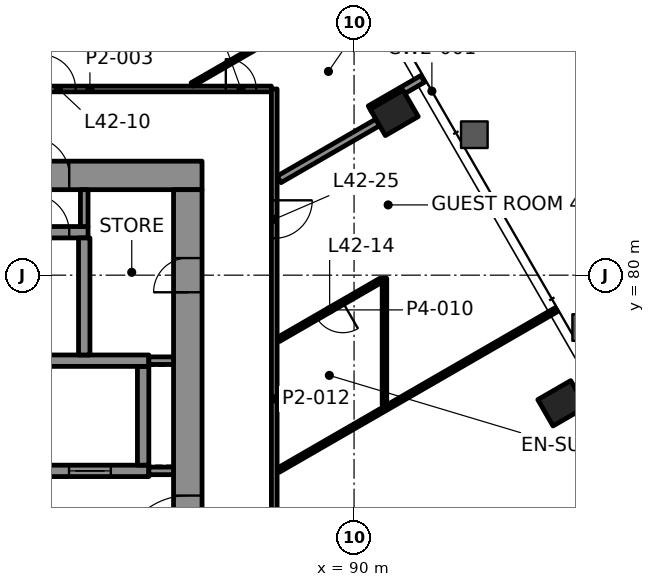
"""IFC4 building model, lengths in metres.
Left out: names, types, materials, properties, quantities, classifications, styles, units other than length and angle.
Written with IfcOpenShell. Run it as: python <this file> out.ifc"""

import sys

from ifc_helpers import new_model, si_unit, direction, frame, frame_2d, origin, origin_2d, place, context, subcontext, project, spatial, rectangle, hollow_rectangle, extrude, element, fill, save


model = new_model("IFC4")
c1 = context("Model", 3, precision=1e-05, world=origin(), true_north=direction((0.0, 1.0)))
c2 = subcontext(c1, "Body", "Model", "MODEL_VIEW")
j1 = project(units=[si_unit("LENGTHUNIT", "METRE"), si_unit("PLANEANGLEUNIT", "RADIAN")], contexts=[c1])
p1 = place(None, origin())
s1 = spatial("IfcSite", under=j1, at=p1, CompositionType="ELEMENT")
p2 = place(p1, origin())
s2 = spatial("IfcBuilding", under=s1, at=p2, CompositionType="ELEMENT")
p3 = place(p2, frame((0.0, 0.0, 183.1)))
s3 = spatial("IfcBuildingStorey", under=s2, at=p3, CompositionType="ELEMENT", Elevation=183.1)
for number, where, z_axis, x_axis in (
    (1, (95.468, 76.628, -0.0), (0.0, 0.0, 1.0), (-0.5, 0.866, 0.0)),
    (2, (91.056, 84.27, -0.0), (0.0, 0.0, 1.0), (-0.5, 0.866, 0.0)),
):
    element("IfcColumn", number, at=place(p3, frame(where, z_axis=z_axis, x_axis=x_axis)), inside=s3, PredefinedType="COLUMN", context=c2, shape_type="SweptSolid", body=[
        extrude(hollow_rectangle(XDim=0.8, YDim=1.0, WallThickness=0.05, at=origin_2d()), origin(), (0.0, 0.0, 1.0), 3.9),
    ])
p4 = place(p3, frame((64.0, 82.625, 0.0), z_axis=(0.0, 0.0, 1.0), x_axis=(1.0, 0.0, 0.0)))
e3 = element("IfcWall", 3, at=p4, inside=s3, PredefinedType="SHEAR", context=c2, shape_type="SweptSolid", body=[
    extrude(rectangle(XDim=22.0, YDim=0.75, at=frame_2d((11.0, 0.0))), origin(), (0.0, 0.0, 1.0), 3.7),
])
p5 = place(p4, frame((3.695, 0.0, 0.0)))
e4 = element("IfcOpeningElement", 4, at=p5, cuts=e3, PredefinedType="OPENING", context=c2, shape_type="SweptSolid", body=[
    extrude(rectangle(XDim=1.0, YDim=2.1, at=frame_2d((0.5, 1.05))), frame((0.0, 0.385, 0.0), z_axis=(0.0, -1.0, 0.0), x_axis=(1.0, 0.0, 0.0)), (0.0, 0.0, 1.0), 0.77),
])
p6 = place(p4, frame((17.505, 0.0, 0.0)))
e5 = element("IfcOpeningElement", 5, at=p6, cuts=e3, PredefinedType="OPENING", context=c2, shape_type="SweptSolid", body=[
    extrude(rectangle(XDim=1.0, YDim=2.1, at=frame_2d((0.5, 1.05))), frame((0.0, 0.385, 0.0), z_axis=(0.0, -1.0, 0.0), x_axis=(1.0, 0.0, 0.0)), (0.0, 0.0, 1.0), 0.77),
])
p7 = place(p4, frame((10.65, 0.0, 0.0)))
e6 = element("IfcOpeningElement", 6, at=p7, cuts=e3, PredefinedType="OPENING", context=c2, shape_type="SweptSolid", body=[
    extrude(rectangle(XDim=0.9, YDim=2.1, at=frame_2d((0.45, 1.05))), frame((0.0, 0.385, 0.0), z_axis=(0.0, -1.0, 0.0), x_axis=(1.0, 0.0, 0.0)), (0.0, 0.0, 1.0), 0.77),
])
p8 = place(p3, frame((85.625, 67.75, 0.0), z_axis=(0.0, 0.0, 1.0), x_axis=(0.0, 1.0, 0.0)))
e7 = element("IfcWall", 7, at=p8, inside=s3, PredefinedType="SHEAR", context=c2, shape_type="SweptSolid", body=[
    extrude(rectangle(XDim=14.5, YDim=0.75, at=frame_2d((7.25, 0.0))), origin(), (0.0, 0.0, 1.0), 3.7),
])
p9 = place(p8, frame((4.65, 0.0, 0.0)))
e8 = element("IfcOpeningElement", 8, at=p9, cuts=e7, PredefinedType="OPENING", context=c2, shape_type="SweptSolid", body=[
    extrude(rectangle(XDim=1.8, YDim=2.1, at=frame_2d((0.9, 1.05))), frame((0.0, 0.385, 0.0), z_axis=(0.0, -1.0, 0.0), x_axis=(1.0, 0.0, 0.0)), (0.0, 0.0, 1.0), 0.77),
])
p10 = place(p8, frame((11.8, 0.0, 0.0)))
e9 = element("IfcOpeningElement", 9, at=p10, cuts=e7, PredefinedType="OPENING", context=c2, shape_type="SweptSolid", body=[
    extrude(rectangle(XDim=0.9, YDim=2.1, at=frame_2d((0.45, 1.05))), frame((0.0, 0.385, 0.0), z_axis=(0.0, -1.0, 0.0), x_axis=(1.0, 0.0, 0.0)), (0.0, 0.0, 1.0), 0.77),
])
p11 = place(p3, frame((70.3, 74.85, 0.0), z_axis=(0.0, 0.0, 1.0), x_axis=(1.0, 0.0, 0.0)))
e10 = element("IfcWall", 10, at=p11, inside=s3, PredefinedType="SHEAR", context=c2, shape_type="SweptSolid", body=[
    extrude(rectangle(XDim=14.3, YDim=0.3, at=frame_2d((7.15, 0.0))), origin(), (0.0, 0.0, 1.0), 3.7),
])
p12 = place(p11, frame((3.8, 0.0, 0.0)))
e11 = element("IfcOpeningElement", 11, at=p12, cuts=e10, PredefinedType="OPENING", context=c2, shape_type="SweptSolid", body=[
    extrude(rectangle(XDim=1.1, YDim=2.1, at=frame_2d((0.55, 1.05))), frame((0.0, 0.16, 0.0), z_axis=(0.0, -1.0, 0.0), x_axis=(1.0, 0.0, 0.0)), (0.0, 0.0, 1.0), 0.32),
])
p13 = place(p11, frame((12.2, 0.0, 0.0)))
e12 = element("IfcOpeningElement", 12, at=p13, cuts=e10, PredefinedType="OPENING", context=c2, shape_type="SweptSolid", body=[
    extrude(rectangle(XDim=1.1, YDim=2.1, at=frame_2d((0.55, 1.05))), frame((0.0, 0.16, 0.0), z_axis=(0.0, -1.0, 0.0), x_axis=(1.0, 0.0, 0.0)), (0.0, 0.0, 1.0), 0.32),
])
p14 = place(p3, frame((84.45, 75.0, 0.0), z_axis=(0.0, 0.0, 1.0), x_axis=(0.0, 1.0, 0.0)))
e13 = element("IfcWall", 13, at=p14, inside=s3, PredefinedType="SHEAR", context=c2, shape_type="SweptSolid", body=[
    extrude(rectangle(XDim=2.6, YDim=0.3, at=frame_2d((1.3, 0.0))), origin(), (0.0, 0.0, 1.0), 3.7),
])
p15 = place(p3, frame((67.15, 77.75, 0.0), z_axis=(0.0, 0.0, 1.0), x_axis=(1.0, 0.0, 0.0)))
e14 = element("IfcWall", 14, at=p15, inside=s3, PredefinedType="SHEAR", context=c2, shape_type="SweptSolid", body=[
    extrude(rectangle(XDim=17.45, YDim=0.3, at=frame_2d((8.725, 0.0))), origin(), (0.0, 0.0, 1.0), 3.7),
])
p16 = place(p15, frame((0.545, 0.0, 0.0)))
e15 = element("IfcOpeningElement", 15, at=p16, cuts=e14, PredefinedType="OPENING", context=c2, shape_type="SweptSolid", body=[
    extrude(rectangle(XDim=1.0, YDim=2.1, at=frame_2d((0.5, 1.05))), frame((0.0, 0.16, 0.0), z_axis=(0.0, -1.0, 0.0), x_axis=(1.0, 0.0, 0.0)), (0.0, 0.0, 1.0), 0.32),
])
p17 = place(p3, frame((76.14, 81.13, 0.0), z_axis=(0.0, 0.0, 1.0), x_axis=(1.0, 0.0, 0.0)))
e16 = element("IfcWall", 16, at=p17, inside=s3, PredefinedType="SHEAR", context=c2, shape_type="SweptSolid", body=[
    extrude(rectangle(XDim=6.86, YDim=0.3, at=frame_2d((3.43, 0.0))), origin(), (0.0, 0.0, 1.0), 3.7),
])
p18 = place(p17, frame((5.365, 0.0, 0.0)))
e17 = element("IfcOpeningElement", 17, at=p18, cuts=e16, PredefinedType="OPENING", context=c2, shape_type="SweptSolid", body=[
    extrude(rectangle(XDim=1.0, YDim=2.1, at=frame_2d((0.5, 1.05))), frame((0.0, 0.16, 0.0), z_axis=(0.0, -1.0, 0.0), x_axis=(1.0, 0.0, 0.0)), (0.0, 0.0, 1.0), 0.32),
])
p19 = place(p3, frame((82.9, 77.9, 0.0), z_axis=(0.0, 0.0, 1.0), x_axis=(0.0, 1.0, 0.0)))
e18 = element("IfcWall", 18, at=p19, inside=s3, PredefinedType="SHEAR", context=c2, shape_type="SweptSolid", body=[
    extrude(rectangle(XDim=3.08, YDim=0.3, at=frame_2d((1.54, 0.0))), origin(), (0.0, 0.0, 1.0), 3.7),
])
p20 = place(p3, frame((78.275, 84.9, 0.0), z_axis=(0.0, 0.0, 1.0), x_axis=(1.0, 0.0, 0.0)))
e19 = element("IfcWall", 19, at=p20, inside=s3, PredefinedType="PARTITIONING", context=c2, shape_type="SweptSolid", body=[
    extrude(rectangle(XDim=9.55, YDim=0.15, at=frame_2d((4.775, 0.0))), origin(), (0.0, 0.0, 1.0), 3.1),
])
p21 = place(p20, frame((3.497, 0.0, 0.0)))
e20 = element("IfcOpeningElement", 20, at=p21, cuts=e19, PredefinedType="OPENING", context=c2, shape_type="SweptSolid", body=[
    extrude(rectangle(XDim=0.9, YDim=2.1, at=frame_2d((0.45, 1.05))), frame((0.0, 0.085, 0.0), z_axis=(0.0, -1.0, 0.0), x_axis=(1.0, 0.0, 0.0)), (0.0, 0.0, 1.0), 0.17),
])
p22 = place(p20, frame((8.351, 0.0, 0.0)))
e21 = element("IfcOpeningElement", 21, at=p22, cuts=e19, PredefinedType="OPENING", context=c2, shape_type="SweptSolid", body=[
    extrude(rectangle(XDim=0.8, YDim=2.1, at=frame_2d((0.4, 1.05))), frame((0.0, 0.085, 0.0), z_axis=(0.0, -1.0, 0.0), x_axis=(1.0, 0.0, 0.0)), (0.0, 0.0, 1.0), 0.17),
])
p23 = place(p3, frame((88.01, 74.869, 0.0), z_axis=(0.0, 0.0, 1.0), x_axis=(0.866017924271, 0.500012954673, 0.0)))
e22 = element("IfcWall", 22, at=p23, inside=s3, PredefinedType="PARTITIONING", context=c2, shape_type="SweptSolid", body=[
    extrude(rectangle(XDim=8.439, YDim=0.12, at=frame_2d((4.219, 0.0))), origin(), (0.0, 0.0, 1.0), 3.022),
])
p24 = place(p3, frame((90.705, 79.865, 0.0), z_axis=(0.0, 0.0, 1.0), x_axis=(-0.866009247561, -0.500027982357, 0.0)))
e23 = element("IfcWall", 23, at=p24, inside=s3, PredefinedType="PARTITIONING", context=c2, shape_type="SweptSolid", body=[
    extrude(rectangle(XDim=3.113, YDim=0.12, at=frame_2d((1.556, 0.0))), origin(), (0.0, 0.0, 1.0), 3.1),
])
p25 = place(p24, frame((1.156, 0.0, 0.0)))
e24 = element("IfcOpeningElement", 24, at=p25, cuts=e23, PredefinedType="OPENING", context=c2, shape_type="SweptSolid", body=[
    extrude(rectangle(XDim=0.8, YDim=2.1, at=frame_2d((0.4, 1.05))), frame((0.0, 0.07, 0.0), z_axis=(0.0, -1.0, 0.0), x_axis=(1.0, 0.0, 0.0)), (0.0, 0.0, 1.0), 0.14),
])
p26 = place(p3, frame((88.027, 82.521, 0.0), z_axis=(0.0, 0.0, 1.0), x_axis=(0.866029639064, 0.499992664208, 0.0)))
e25 = element("IfcWall", 25, at=p26, inside=s3, PredefinedType="PARTITIONING", context=c2, shape_type="SweptSolid", body=[
    extrude(rectangle(XDim=2.998, YDim=0.2, at=frame_2d((1.499, 0.0))), origin(), (0.0, 0.0, 1.0), 3.1),
])
p27 = place(p3, frame((90.423, 84.367, 0.0), z_axis=(0.0, 0.0, 1.0), x_axis=(0.865989903783, 0.500061482766, 0.0)))
e26 = element("IfcWall", 26, at=p27, inside=s3, PredefinedType="PARTITIONING", context=c2, shape_type="SweptSolid", body=[
    extrude(rectangle(XDim=1.6, YDim=0.2, at=frame_2d((0.8, 0.0))), origin(), (0.0, 0.0, 1.0), 3.022),
])
p28 = place(p3, frame((85.737, 85.02, 0.0), z_axis=(0.0, 0.0, 1.0), x_axis=(0.8660338432, 0.499985382219, 0.0)))
e27 = element("IfcWall", 27, at=p28, inside=s3, PredefinedType="PARTITIONING", context=c2, shape_type="SweptSolid", body=[
    extrude(rectangle(XDim=5.332, YDim=0.1, at=frame_2d((2.666, 0.0))), origin(), (0.0, 0.0, 1.0), 3.022),
])
p29 = place(p3, frame((79.197, 85.065, 0.0), z_axis=(0.0, 0.0, 1.0), x_axis=(0.86602410867, 0.500002243197, 0.0)))
e28 = element("IfcWall", 28, at=p29, inside=s3, PredefinedType="PARTITIONING", context=c2, shape_type="SweptSolid", body=[
    extrude(rectangle(XDim=6.471, YDim=0.2, at=frame_2d((3.235, 0.0))), origin(), (0.0, 0.0, 1.0), 3.1),
])
p30 = place(p3, frame((90.8, 76.59, 0.0), z_axis=(0.0, 0.0, 1.0), x_axis=(0.0, 1.0, 0.0)))
e29 = element("IfcWall", 29, at=p30, inside=s3, PredefinedType="PARTITIONING", context=c2, shape_type="SweptSolid", body=[
    extrude(rectangle(XDim=3.329, YDim=0.12, at=frame_2d((1.665, 0.0))), origin(), (0.0, 0.0, 1.0), 3.1),
])
p31 = place(p3, frame((87.9, 84.9, 0.0), z_axis=(0.0, 0.0, 1.0), x_axis=(0.0, -1.0, 0.0)))
e30 = element("IfcWall", 30, at=p31, inside=s3, PredefinedType="PARTITIONING", context=c2, shape_type="SweptSolid", body=[
    extrude(rectangle(XDim=16.308, YDim=0.15, at=frame_2d((8.154, 0.0))), origin(), (0.0, 0.0, 1.0), 3.1),
])
p32 = place(p31, frame((2.93, 0.0, 0.0)))
e31 = element("IfcOpeningElement", 31, at=p32, cuts=e30, PredefinedType="OPENING", context=c2, shape_type="SweptSolid", body=[
    extrude(rectangle(XDim=1.0, YDim=2.1, at=frame_2d((0.5, 1.05))), frame((0.0, 0.085, 0.0), z_axis=(0.0, -1.0, 0.0), x_axis=(1.0, 0.0, 0.0)), (0.0, 0.0, 1.0), 0.17),
])
p33 = place(p31, frame((12.5, 0.0, 0.0)))
e32 = element("IfcOpeningElement", 32, at=p33, cuts=e30, PredefinedType="OPENING", context=c2, shape_type="SweptSolid", body=[
    extrude(rectangle(XDim=1.2, YDim=2.1, at=frame_2d((0.6, 1.05))), frame((0.0, 0.085, 0.0), z_axis=(0.0, -1.0, 0.0), x_axis=(1.0, 0.0, 0.0)), (0.0, 0.0, 1.0), 0.17),
])
for number, where, z_axis, x_axis in (
    (33, (84.6, 74.85, 0.0), (0.0, 0.0, 1.0), (1.0, 0.0, 0.0)),
    (34, (84.6, 77.75, 0.0), (0.0, 0.0, 1.0), (1.0, 0.0, 0.0)),
):
    element("IfcWall", number, at=place(p3, frame(where, z_axis=z_axis, x_axis=x_axis)), inside=s3, PredefinedType="PARTITIONING", context=c2, shape_type="SweptSolid", body=[
        extrude(rectangle(XDim=0.65, YDim=0.2, at=frame_2d((0.325, 0.0))), origin(), (0.0, 0.0, 1.0), 3.7),
    ])
p34 = place(p3, frame((82.9, 81.28, 0.0), z_axis=(0.0, 0.0, 1.0), x_axis=(0.0, 1.0, 0.0)))
e35 = element("IfcWall", 35, at=p34, inside=s3, PredefinedType="PARTITIONING", context=c2, shape_type="SweptSolid", body=[
    extrude(rectangle(XDim=0.97, YDim=0.2, at=frame_2d((0.485, 0.0))), origin(), (0.0, 0.0, 1.0), 3.7),
])
p35 = place(p21, origin())
e36 = element("IfcDoor", 36, at=p35, inside=s3, OperationType="SINGLE_SWING_LEFT", PredefinedType="DOOR", context=c2, shape_type="SweptSolid", body=[
    extrude(rectangle(XDim=0.9, YDim=2.1, at=frame_2d((0.45, 1.05))), frame((0.0, 0.025, 0.0), z_axis=(0.0, -1.0, 0.0), x_axis=(1.0, 0.0, 0.0)), (0.0, 0.0, 1.0), 0.05),
])
fill(e20, e36)
p36 = place(p22, origin())
e37 = element("IfcDoor", 37, at=p36, inside=s3, OperationType="SINGLE_SWING_RIGHT", PredefinedType="DOOR", context=c2, shape_type="SweptSolid", body=[
    extrude(rectangle(XDim=0.8, YDim=2.1, at=frame_2d((0.4, 1.05))), frame((0.0, 0.025, 0.0), z_axis=(0.0, -1.0, 0.0), x_axis=(1.0, 0.0, 0.0)), (0.0, 0.0, 1.0), 0.05),
])
fill(e21, e37)
p37 = place(p25, origin())
e38 = element("IfcDoor", 38, at=p37, inside=s3, OperationType="SINGLE_SWING_RIGHT", PredefinedType="DOOR", context=c2, shape_type="SweptSolid", body=[
    extrude(rectangle(XDim=0.8, YDim=2.1, at=frame_2d((0.4, 1.05))), frame((0.0, 0.025, 0.0), z_axis=(0.0, -1.0, 0.0), x_axis=(1.0, 0.0, 0.0)), (0.0, 0.0, 1.0), 0.05),
])
fill(e24, e38)
p38 = place(p32, origin())
e39 = element("IfcDoor", 39, at=p38, inside=s3, OperationType="SINGLE_SWING_LEFT", PredefinedType="DOOR", context=c2, shape_type="SweptSolid", body=[
    extrude(rectangle(XDim=1.0, YDim=2.1, at=frame_2d((0.5, 1.05))), frame((0.0, 0.025, 0.0), z_axis=(0.0, -1.0, 0.0), x_axis=(1.0, 0.0, 0.0)), (0.0, 0.0, 1.0), 0.05),
])
fill(e31, e39)
p39 = place(p13, origin())
e40 = element("IfcDoor", 40, at=p39, inside=s3, OperationType="DOUBLE_DOOR_SLIDING", PredefinedType="DOOR", context=c2, shape_type="SweptSolid", body=[
    extrude(rectangle(XDim=1.1, YDim=2.1, at=frame_2d((0.55, 1.05))), frame((0.0, 0.025, 0.0), z_axis=(0.0, -1.0, 0.0), x_axis=(1.0, 0.0, 0.0)), (0.0, 0.0, 1.0), 0.05),
])
fill(e12, e40)
p40 = place(p18, origin())
e41 = element("IfcDoor", 41, at=p40, inside=s3, OperationType="SINGLE_SWING_RIGHT", PredefinedType="DOOR", context=c2, shape_type="SweptSolid", body=[
    extrude(rectangle(XDim=1.0, YDim=2.1, at=frame_2d((0.5, 1.05))), frame((0.0, 0.025, 0.0), z_axis=(0.0, -1.0, 0.0), x_axis=(1.0, 0.0, 0.0)), (0.0, 0.0, 1.0), 0.05),
])
fill(e17, e41)
p41 = place(p6, origin())
e42 = element("IfcDoor", 42, at=p41, inside=s3, OperationType="SINGLE_SWING_LEFT", PredefinedType="DOOR", context=c2, shape_type="SweptSolid", body=[
    extrude(rectangle(XDim=1.0, YDim=2.1, at=frame_2d((0.5, 1.05))), frame((0.0, 0.095, 0.0), z_axis=(0.0, -1.0, 0.0), x_axis=(1.0, 0.0, 0.0)), (0.0, 0.0, 1.0), 0.19),
])
fill(e5, e42)
p42 = place(p9, origin())
e43 = element("IfcDoor", 43, at=p42, inside=s3, OperationType="SINGLE_SWING_RIGHT", PredefinedType="DOOR", context=c2, shape_type="SweptSolid", body=[
    extrude(rectangle(XDim=1.8, YDim=2.1, at=frame_2d((0.9, 1.05))), frame((0.0, 0.095, 0.0), z_axis=(0.0, -1.0, 0.0), x_axis=(1.0, 0.0, 0.0)), (0.0, 0.0, 1.0), 0.19),
])
fill(e8, e43)
p43 = place(p10, origin())
e44 = element("IfcDoor", 44, at=p43, inside=s3, OperationType="SINGLE_SWING_RIGHT", PredefinedType="DOOR", context=c2, shape_type="SweptSolid", body=[
    extrude(rectangle(XDim=0.9, YDim=2.1, at=frame_2d((0.45, 1.05))), frame((0.0, 0.095, 0.0), z_axis=(0.0, -1.0, 0.0), x_axis=(1.0, 0.0, 0.0)), (0.0, 0.0, 1.0), 0.19),
])
fill(e9, e44)
save(model, sys.argv[1])
